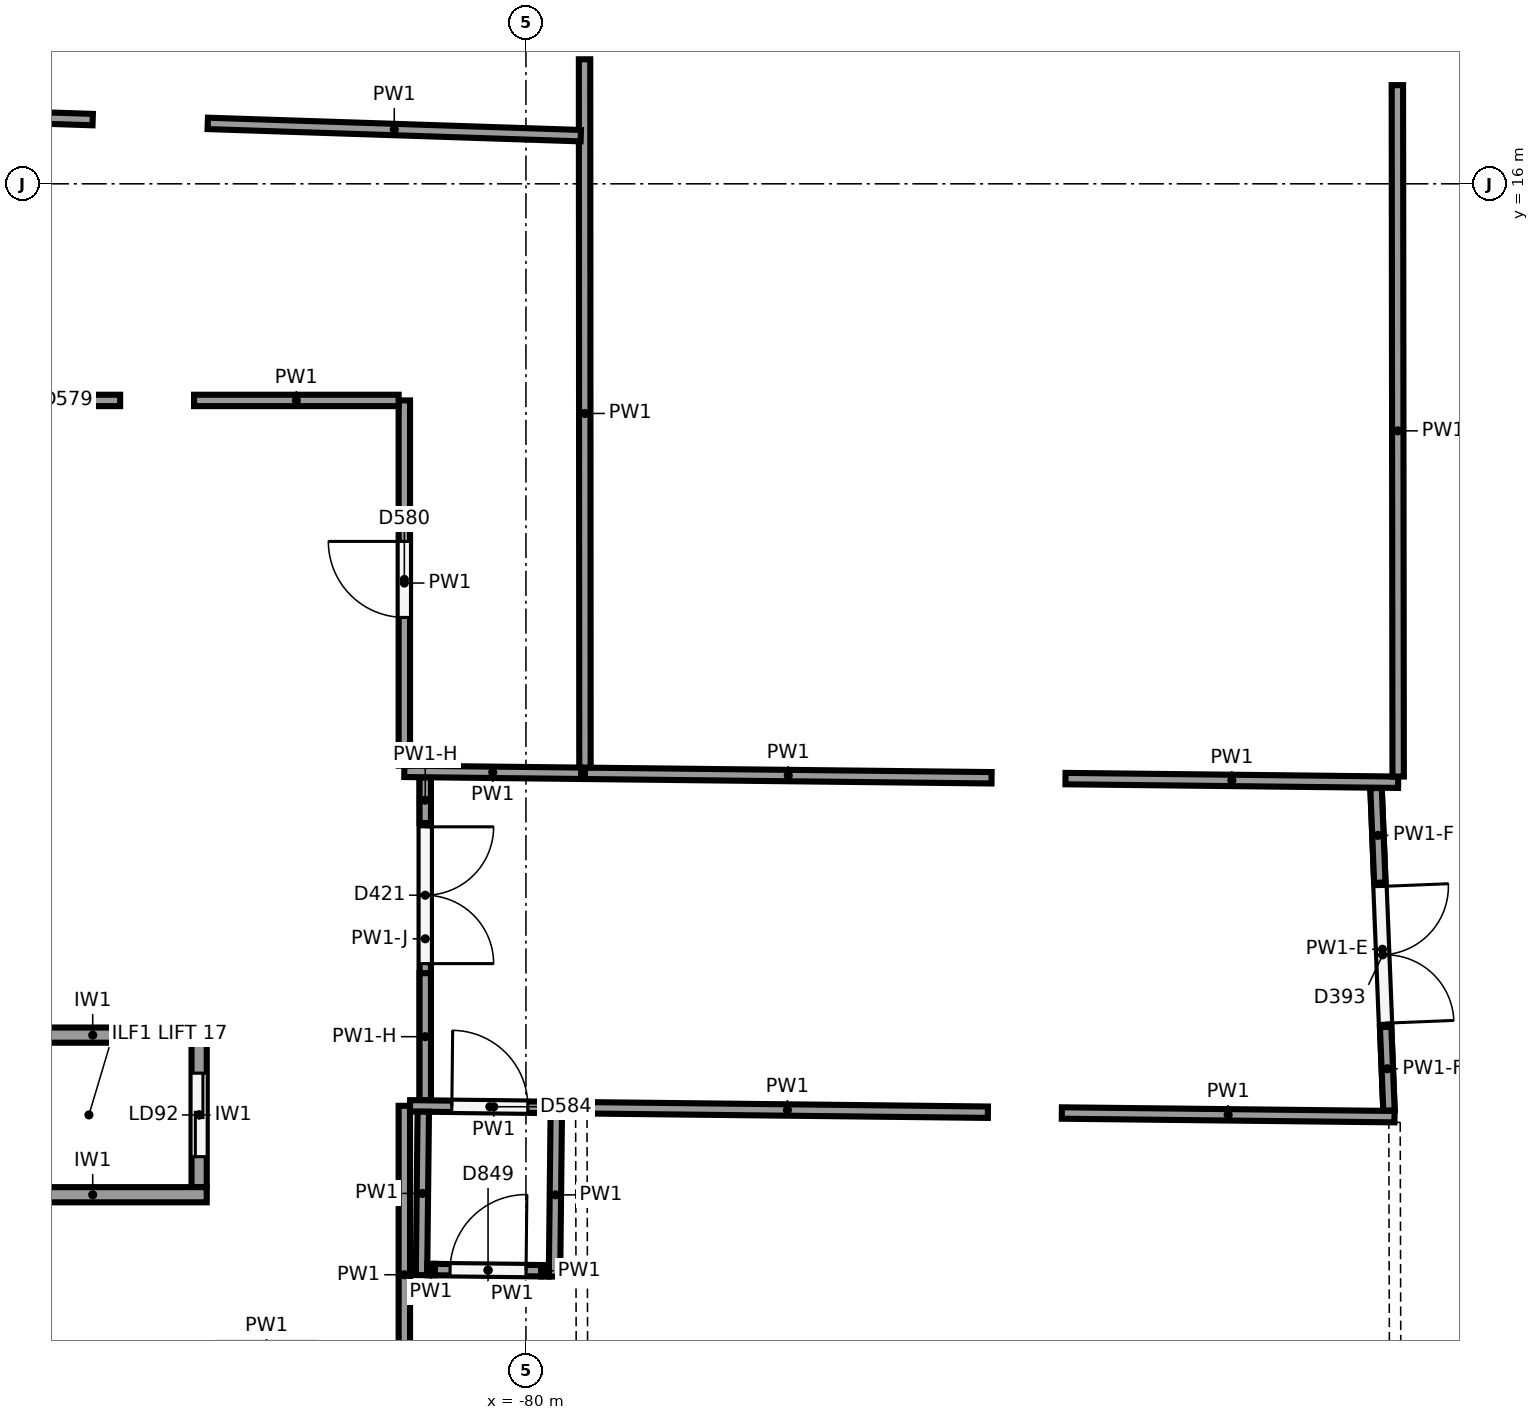
"""IFC4 building model, lengths in metres.
Left out: names, types, materials, properties, quantities, classifications, styles, units other than length and angle.
Written with IfcOpenShell. Run it as: python <this file> out.ifc"""

import sys

from ifc_helpers import new_model, si_unit, direction, frame, frame_2d, origin, origin_2d, place, context, subcontext, project, spatial, rectangle, circle, extrude, element, fill, save


model = new_model("IFC4")
c1 = context("Model", 3, precision=1e-05, world=origin(), true_north=direction((0.0, 1.0)))
c2 = subcontext(c1, "Body", "Model", "MODEL_VIEW")
j1 = project(units=[si_unit("LENGTHUNIT", "METRE"), si_unit("PLANEANGLEUNIT", "RADIAN")], contexts=[c1])
p1 = place(None, origin())
s1 = spatial("IfcSite", under=j1, at=p1, CompositionType="ELEMENT")
p2 = place(p1, origin())
s2 = spatial("IfcBuilding", under=s1, at=p2, CompositionType="ELEMENT")
p3 = place(p2, origin())
s3 = spatial("IfcBuildingStorey", under=s2, at=p3, CompositionType="ELEMENT", Elevation=0.0)
for number, where, z_axis, x_axis in (
    (1, (-73.482, 17.944, 0.0), (0.0, 0.0, 1.0), (1.0, 0.0, 0.0)),
    (2, (-73.498, 5.981, 0.0), (0.0, 0.0, 1.0), (1.0, 0.0, 0.0)),
):
    element("IfcColumn", number, at=place(p3, frame(where, z_axis=z_axis, x_axis=x_axis)), inside=s3, PredefinedType="COLUMN", context=c2, shape_type="SweptSolid", body=[
        extrude(circle(Radius=0.45, at=origin_2d()), origin(), (0.0, 0.0, 1.0), 6.5),
    ])
p4 = place(p3, frame((-84.998, 6.081, 0.0), z_axis=(0.0, 0.0, 1.0), x_axis=(1.0, 0.0, 0.0)))
e3 = element("IfcColumn", 3, at=p4, inside=s3, PredefinedType="COLUMN", context=c2, shape_type="SweptSolid", body=[
    extrude(circle(Radius=0.6, at=origin_2d()), origin(), (0.0, 0.0, 1.0), 6.5),
])
for number, where, z_axis, x_axis in (
    (4, (-87.2, 4.8, 0.0), (0.0, 0.0, 1.0), (1.0, 0.0, 0.0)),
    (5, (-87.2, 2.7, 0.0), (0.0, 0.0, 1.0), (1.0, 0.0, 0.0)),
):
    element("IfcWall", number, at=place(p3, frame(where, z_axis=z_axis, x_axis=x_axis)), inside=s3, PredefinedType="SHEAR", context=c2, shape_type="SweptSolid", body=[
        extrude(rectangle(XDim=3.0, YDim=0.2, at=frame_2d((1.5, 0.0))), origin(), (0.0, 0.0, 1.0), 6.15),
    ])
p5 = place(p3, frame((-84.3, 4.7, 0.0), z_axis=(0.0, 0.0, 1.0), x_axis=(0.0, -1.0, 0.0)))
e6 = element("IfcWall", 6, at=p5, inside=s3, PredefinedType="SHEAR", context=c2, shape_type="SweptSolid", body=[
    extrude(rectangle(XDim=1.9, YDim=0.2, at=frame_2d((0.95, 0.0))), origin(), (0.0, 0.0, 1.0), 6.15),
])
p6 = place(p5, frame((0.4, 0.0, 0.0)))
e7 = element("IfcOpeningElement", 7, at=p6, cuts=e6, PredefinedType="OPENING", context=c2, shape_type="SweptSolid", body=[
    extrude(rectangle(XDim=1.1, YDim=2.1, at=frame_2d((0.55, 1.05))), frame((0.0, 0.11, 0.0), z_axis=(0.0, -1.0, 0.0), x_axis=(1.0, 0.0, 0.0)), (0.0, 0.0, 1.0), 0.22),
])
p7 = place(p3, frame((-68.524, 8.127, 0.0), z_axis=(0.0, 0.0, 1.0), x_axis=(-0.999940244273, 0.01093196608, 0.0)))
e8 = element("IfcWall", 8, at=p7, inside=s3, PredefinedType="PARTITIONING", context=c2, shape_type="SweptSolid", body=[
    extrude(rectangle(XDim=4.377, YDim=0.15, at=frame_2d((2.188, 0.0))), origin(), (0.0, 0.0, 1.0), 6.15),
])
p8 = place(p3, frame((-73.874, 8.186, 0.0), z_axis=(0.0, 0.0, 1.0), x_axis=(-0.999939527069, 0.010997372611, 0.0)))
e9 = element("IfcWall", 9, at=p8, inside=s3, PredefinedType="PARTITIONING", context=c2, shape_type="SweptSolid", body=[
    extrude(rectangle(XDim=5.35, YDim=0.15, at=frame_2d((2.675, 0.0))), origin(), (0.0, 0.0, 1.0), 6.15),
])
p9 = place(p3, frame((-79.224, 8.319, 0.0), z_axis=(0.0, 0.0, 1.0), x_axis=(-0.00057636878, 0.9999998339, 0.0)))
e10 = element("IfcWall", 10, at=p9, inside=s3, PredefinedType="PARTITIONING", context=c2, shape_type="SweptSolid", body=[
    extrude(rectangle(XDim=9.319, YDim=0.15, at=frame_2d((4.659, 0.0))), origin(), (0.0, 0.0, 1.0), 6.15),
])
p10 = place(p3, frame((-68.535, 17.298, 0.0), z_axis=(0.0, 0.0, 1.0), x_axis=(0.001127273963, -0.999999364627, 0.0)))
e11 = element("IfcWall", 11, at=p10, inside=s3, PredefinedType="PARTITIONING", context=c2, shape_type="SweptSolid", body=[
    extrude(rectangle(XDim=9.096, YDim=0.15, at=frame_2d((4.548, 0.0))), origin(), (0.0, 0.0, 1.0), 6.15),
])
p11 = place(p3, frame((-91.413, 17.032, 0.0), z_axis=(0.0, 0.0, 1.0), x_axis=(0.999458991221, -0.032889586018, 0.0)))
e12 = element("IfcWall", 12, at=p11, inside=s3, PredefinedType="PARTITIONING", context=c2, shape_type="SweptSolid", body=[
    extrude(rectangle(XDim=5.716, YDim=0.15, at=frame_2d((2.858, 0.0))), origin(), (0.0, 0.0, 1.0), 6.15),
])
p12 = place(p3, frame((-85.339, 13.15, 0.0), z_axis=(0.0, 0.0, 1.0), x_axis=(-1.0, 0.0, 0.0)))
e13 = element("IfcWall", 13, at=p12, inside=s3, PredefinedType="PARTITIONING", context=c2, shape_type="SweptSolid", body=[
    extrude(rectangle(XDim=3.221, YDim=0.15, at=frame_2d((1.61, 0.0))), origin(), (0.0, 0.0, 1.0), 6.15),
])
p13 = place(p12, frame((1.2, 0.0, 0.0)))
e14 = element("IfcOpeningElement", 14, at=p13, cuts=e13, PredefinedType="OPENING", context=c2, shape_type="SweptSolid", body=[
    extrude(rectangle(XDim=1.0, YDim=2.1, at=frame_2d((0.5, 1.05))), frame((0.0, 0.085, 0.0), z_axis=(0.0, -1.0, 0.0), x_axis=(1.0, 0.0, 0.0)), (0.0, 0.0, 1.0), 0.17),
])
p14 = place(p3, frame((-79.274, 8.245, 0.0), z_axis=(0.0, 0.0, 1.0), x_axis=(-0.999940447056, 0.010913401878, 0.0)))
e15 = element("IfcWall", 15, at=p14, inside=s3, PredefinedType="PARTITIONING", context=c2, shape_type="SweptSolid", body=[
    extrude(rectangle(XDim=2.327, YDim=0.15, at=frame_2d((1.163, 0.0))), origin(), (0.0, 0.0, 1.0), 6.15),
])
p15 = place(p3, frame((-81.6, 8.345, 0.0), z_axis=(0.0, 0.0, 1.0), x_axis=(0.0, 1.0, 0.0)))
e16 = element("IfcWall", 16, at=p15, inside=s3, PredefinedType="PARTITIONING", context=c2, shape_type="SweptSolid", body=[
    extrude(rectangle(XDim=4.805, YDim=0.15, at=frame_2d((2.402, 0.0))), origin(), (0.0, 0.0, 1.0), 6.15),
])
p16 = place(p15, frame((1.95, 0.0, 0.0)))
e17 = element("IfcOpeningElement", 17, at=p16, cuts=e16, PredefinedType="OPENING", context=c2, shape_type="SweptSolid", body=[
    extrude(rectangle(XDim=1.0, YDim=2.1, at=frame_2d((0.5, 1.05))), frame((0.0, 0.085, 0.0), z_axis=(0.0, -1.0, 0.0), x_axis=(1.0, 0.0, 0.0)), (0.0, 0.0, 1.0), 0.17),
])
p17 = place(p3, frame((-81.675, 13.15, 0.0), z_axis=(0.0, 0.0, 1.0), x_axis=(-1.0, 0.0, 0.0)))
e18 = element("IfcWall", 18, at=p17, inside=s3, PredefinedType="PARTITIONING", context=c2, shape_type="SweptSolid", body=[
    extrude(rectangle(XDim=2.692, YDim=0.15, at=frame_2d((1.346, 0.0))), origin(), (0.0, 0.0, 1.0), 6.15),
])
p18 = place(p3, frame((-84.187, 16.795, 0.0), z_axis=(0.0, 0.0, 1.0), x_axis=(0.999458234684, -0.032912567844, 0.0)))
e19 = element("IfcWall", 19, at=p18, inside=s3, PredefinedType="PARTITIONING", context=c2, shape_type="SweptSolid", body=[
    extrude(rectangle(XDim=4.911, YDim=0.15, at=frame_2d((2.455, 0.0))), origin(), (0.0, 0.0, 1.0), 6.15),
])
p19 = place(p3, frame((-79.249, -5.55, 0.0), z_axis=(0.0, 0.0, 1.0), x_axis=(-0.002442883638, 0.999997016155, 0.0)))
e20 = element("IfcWall", 20, at=p19, inside=s3, PredefinedType="PARTITIONING", context=c2, shape_type="SweptSolid", body=[
    extrude(rectangle(XDim=9.394, YDim=0.15, at=frame_2d((4.697, 0.0))), origin(), (0.0, 0.0, 1.0), 6.15),
])
p20 = place(p3, frame((-79.197, 3.844, 0.0), z_axis=(0.0, 0.0, 1.0), x_axis=(0.999939838458, -0.010969022991, 0.0)))
e21 = element("IfcWall", 21, at=p20, inside=s3, PredefinedType="PARTITIONING", context=c2, shape_type="SweptSolid", body=[
    extrude(rectangle(XDim=5.275, YDim=0.15, at=frame_2d((2.637, 0.0))), origin(), (0.0, 0.0, 1.0), 6.15),
])
p21 = place(p3, frame((-72.949, 3.775, 0.0), z_axis=(0.0, 0.0, 1.0), x_axis=(0.999940244273, -0.01093196608, 0.0)))
e22 = element("IfcWall", 22, at=p21, inside=s3, PredefinedType="PARTITIONING", context=c2, shape_type="SweptSolid", body=[
    extrude(rectangle(XDim=4.377, YDim=0.15, at=frame_2d((2.188, 0.0))), origin(), (0.0, 0.0, 1.0), 6.15),
])
p22 = place(p3, frame((-68.572, 3.652, 0.0), z_axis=(0.0, 0.0, 1.0), x_axis=(0.00249603345, -0.999996884904, 0.0)))
e23 = element("IfcWall", 23, at=p22, inside=s3, PredefinedType="PARTITIONING", context=c2, shape_type="SweptSolid", body=[
    extrude(rectangle(XDim=9.096, YDim=0.15, at=frame_2d((4.548, 0.0))), origin(), (0.0, 0.0, 1.0), 6.15),
])
p23 = place(p22, frame((3.95, 0.0, 0.0)))
e24 = element("IfcOpeningElement", 24, at=p23, cuts=e23, PredefinedType="OPENING", context=c2, shape_type="SweptSolid", body=[
    extrude(rectangle(XDim=1.0, YDim=2.1, at=frame_2d((0.5, 1.05))), frame((0.0, 0.085, 0.0), z_axis=(0.0, -1.0, 0.0), x_axis=(1.0, 0.0, 0.0)), (0.0, 0.0, 1.0), 0.17),
])
p24 = place(p3, frame((-81.6, -0.575, 0.0), z_axis=(0.0, 0.0, 1.0), x_axis=(0.0, 1.0, 0.0)))
e25 = element("IfcWall", 25, at=p24, inside=s3, PredefinedType="PARTITIONING", context=c2, shape_type="SweptSolid", body=[
    extrude(rectangle(XDim=4.445, YDim=0.15, at=frame_2d((2.223, 0.0))), origin(), (0.0, 0.0, 1.0), 6.15),
])
p25 = place(p3, frame((-81.525, 3.869, 0.0), z_axis=(0.0, 0.0, 1.0), x_axis=(0.999941036186, -0.010859288735, 0.0)))
e26 = element("IfcWall", 26, at=p25, inside=s3, PredefinedType="PARTITIONING", context=c2, shape_type="SweptSolid", body=[
    extrude(rectangle(XDim=2.203, YDim=0.15, at=frame_2d((1.102, 0.0))), origin(), (0.0, 0.0, 1.0), 6.15),
])
p26 = place(p25, frame((0.55, 0.0, 0.0)))
e27 = element("IfcOpeningElement", 27, at=p26, cuts=e26, PredefinedType="OPENING", context=c2, shape_type="SweptSolid", body=[
    extrude(rectangle(XDim=1.0, YDim=2.1, at=frame_2d((0.5, 1.05))), frame((0.0, 0.085, 0.0), z_axis=(0.0, -1.0, 0.0), x_axis=(1.0, 0.0, 0.0)), (0.0, 0.0, 1.0), 0.17),
])
for number, where, z_axis, x_axis in (
    (28, (-81.351, 3.792, 0.0), (0.0, 0.0, 1.0), (-0.011, -1.0, 0.0)),
    (29, (-79.601, 3.773, 0.0), (0.0, 0.0, 1.0), (-0.011, -1.0, 0.0)),
):
    element("IfcWall", number, at=place(p3, frame(where, z_axis=z_axis, x_axis=x_axis)), inside=s3, PredefinedType="PARTITIONING", context=c2, shape_type="SweptSolid", body=[
        extrude(rectangle(XDim=2.15, YDim=0.15, at=frame_2d((1.075, 0.0))), origin(), (0.0, 0.0, 1.0), 6.15),
    ])
p27 = place(p3, frame((-81.299, 1.717, 0.0), z_axis=(0.0, 0.0, 1.0), x_axis=(0.999952412677, -0.009755633294, 0.0)))
e30 = element("IfcWall", 30, at=p27, inside=s3, PredefinedType="PARTITIONING", context=c2, shape_type="SweptSolid", body=[
    extrude(rectangle(XDim=0.1, YDim=0.15, at=frame_2d((0.05, 0.0))), origin(), (0.0, 0.0, 1.0), 6.15),
])
p28 = place(p3, frame((-81.198, 1.716, 0.0), z_axis=(0.0, 0.0, 1.0), x_axis=(0.999939647341, -0.010986431424, 0.0)))
e31 = element("IfcWall", 31, at=p28, inside=s3, PredefinedType="PARTITIONING", context=c2, shape_type="SweptSolid", body=[
    extrude(rectangle(XDim=1.4, YDim=0.15, at=frame_2d((0.7, 0.0))), origin(), (0.0, 0.0, 1.0), 6.15),
])
p29 = place(p28, frame((0.2, 0.0, 0.0)))
e32 = element("IfcOpeningElement", 32, at=p29, cuts=e31, PredefinedType="OPENING", context=c2, shape_type="SweptSolid", body=[
    extrude(rectangle(XDim=1.0, YDim=2.1, at=frame_2d((0.5, 1.05))), frame((0.0, 0.085, 0.0), z_axis=(0.0, -1.0, 0.0), x_axis=(1.0, 0.0, 0.0)), (0.0, 0.0, 1.0), 0.17),
])
p30 = place(p3, frame((-79.799, 1.7, 0.0), z_axis=(0.0, 0.0, 1.0), x_axis=(0.999952412677, -0.009755633294, 0.0)))
e33 = element("IfcWall", 33, at=p30, inside=s3, PredefinedType="PARTITIONING", context=c2, shape_type="SweptSolid", body=[
    extrude(rectangle(XDim=0.1, YDim=0.15, at=frame_2d((0.05, 0.0))), origin(), (0.0, 0.0, 1.0), 6.15),
])
p31 = place(p3, frame((-81.325, 8.19, 0.0), z_axis=(0.0, 0.0, 1.0), x_axis=(0.0, -1.0, 0.0)))
e34 = element("IfcWall", 34, at=p31, inside=s3, PredefinedType="PARTITIONING", context=c2, shape_type="SweptSolid", body=[
    extrude(rectangle(XDim=4.247, YDim=0.15, at=frame_2d((2.123, 0.0))), origin(), (0.0, 0.0, 1.0), 5.05),
])
p32 = place(p31, frame((0.65, 0.0, 0.0)))
e35 = element("IfcOpeningElement", 35, at=p32, cuts=e34, PredefinedType="OPENING", context=c2, shape_type="SweptSolid", body=[
    extrude(rectangle(XDim=1.8, YDim=2.1, at=frame_2d((0.9, 1.05))), frame((0.0, 0.085, 0.0), z_axis=(0.0, -1.0, 0.0), x_axis=(1.0, 0.0, 0.0)), (0.0, 0.0, 1.0), 0.17),
])
p33 = place(p3, frame((-81.325, 8.19, 5.05), z_axis=(0.0, 0.0, 1.0), x_axis=(0.0, -1.0, 0.0)))
e36 = element("IfcWall", 36, at=p33, inside=s3, PredefinedType="PARTITIONING", context=c2, shape_type="SweptSolid", body=[
    extrude(rectangle(XDim=0.6, YDim=0.15, at=frame_2d((0.3, 0.0))), origin(), (0.0, 0.0, 1.0), 1.1),
])
p34 = place(p3, frame((-81.325, 5.615, 5.05), z_axis=(0.0, 0.0, 1.0), x_axis=(0.0, -1.0, 0.0)))
e37 = element("IfcWall", 37, at=p34, inside=s3, PredefinedType="PARTITIONING", context=c2, shape_type="SweptSolid", body=[
    extrude(rectangle(XDim=1.671, YDim=0.15, at=frame_2d((0.835, 0.0))), origin(), (0.0, 0.0, 1.0), 1.1),
])
p35 = place(p3, frame((-68.815, 8.05, 0.0), z_axis=(0.0, 0.0, 1.0), x_axis=(0.040078263849, -0.999196543612, 0.0)))
e38 = element("IfcWall", 38, at=p35, inside=s3, PredefinedType="PARTITIONING", context=c2, shape_type="SweptSolid", body=[
    extrude(rectangle(XDim=4.246, YDim=0.15, at=frame_2d((2.123, 0.0))), origin(), (0.0, 0.0, 1.0), 5.25),
])
p36 = place(p35, frame((1.296, 0.0, 0.0)))
e39 = element("IfcOpeningElement", 39, at=p36, cuts=e38, PredefinedType="OPENING", context=c2, shape_type="SweptSolid", body=[
    extrude(rectangle(XDim=1.8, YDim=2.1, at=frame_2d((0.9, 1.05))), frame((0.0, 0.085, 0.0), z_axis=(0.0, -1.0, 0.0), x_axis=(1.0, 0.0, 0.0)), (0.0, 0.0, 1.0), 0.17),
])
p37 = place(p3, frame((-68.689, 4.907, 5.25), z_axis=(0.0, 0.0, 1.0), x_axis=(0.0401719, -0.999192783426, 0.0)))
e40 = element("IfcWall", 40, at=p37, inside=s3, PredefinedType="PARTITIONING", context=c2, shape_type="SweptSolid", body=[
    extrude(rectangle(XDim=1.1, YDim=0.15, at=frame_2d((0.55, 0.0))), origin(), (0.0, 0.0, 1.0), 0.9),
])
p38 = place(p3, frame((-68.815, 8.05, 5.25), z_axis=(0.0, 0.0, 1.0), x_axis=(0.039975864231, -0.999200645656, 0.0)))
e41 = element("IfcWall", 41, at=p38, inside=s3, PredefinedType="PARTITIONING", context=c2, shape_type="SweptSolid", body=[
    extrude(rectangle(XDim=1.246, YDim=0.15, at=frame_2d((0.623, 0.0))), origin(), (0.0, 0.0, 1.0), 0.9),
])
p39 = place(p6, origin())
e42 = element("IfcDoor", 42, at=p39, inside=s3, OperationType="SLIDING_TO_RIGHT", PredefinedType="DOOR", context=c2, shape_type="SweptSolid", body=[
    extrude(rectangle(XDim=1.1, YDim=2.1, at=frame_2d((0.55, 1.05))), frame((0.0, 0.025, 0.0), z_axis=(0.0, -1.0, 0.0), x_axis=(1.0, 0.0, 0.0)), (0.0, 0.0, 1.0), 0.05),
])
fill(e7, e42)
p40 = place(p16, origin())
e43 = element("IfcDoor", 43, at=p40, inside=s3, OperationType="SINGLE_SWING_RIGHT", PredefinedType="DOOR", context=c2, shape_type="SweptSolid", body=[
    extrude(rectangle(XDim=1.0, YDim=2.1, at=frame_2d((0.5, 1.05))), frame((0.0, 0.025, 0.0), z_axis=(0.0, -1.0, 0.0), x_axis=(1.0, 0.0, 0.0)), (0.0, 0.0, 1.0), 0.05),
])
fill(e17, e43)
p41 = place(p26, origin())
e44 = element("IfcDoor", 44, at=p41, inside=s3, OperationType="SINGLE_SWING_LEFT", PredefinedType="DOOR", context=c2, shape_type="SweptSolid", body=[
    extrude(rectangle(XDim=1.0, YDim=2.1, at=frame_2d((0.5, 1.05))), frame((0.0, 0.025, 0.0), z_axis=(0.0, -1.0, 0.0), x_axis=(1.0, 0.0, 0.0)), (0.0, 0.0, 1.0), 0.05),
])
fill(e27, e44)
p42 = place(p29, origin())
e45 = element("IfcDoor", 45, at=p42, inside=s3, OperationType="SINGLE_SWING_RIGHT", PredefinedType="DOOR", context=c2, shape_type="SweptSolid", body=[
    extrude(rectangle(XDim=1.0, YDim=2.1, at=frame_2d((0.5, 1.05))), frame((0.0, 0.025, 0.0), z_axis=(0.0, -1.0, 0.0), x_axis=(1.0, 0.0, 0.0)), (0.0, 0.0, 1.0), 0.05),
])
fill(e32, e45)
p43 = place(p32, origin())
e46 = element("IfcDoor", 46, at=p43, inside=s3, OperationType="DOUBLE_DOOR_SINGLE_SWING", PredefinedType="DOOR", context=c2, shape_type="SweptSolid", body=[
    extrude(rectangle(XDim=1.8, YDim=2.1, at=frame_2d((0.9, 1.05))), frame((0.0, 0.025, 0.0), z_axis=(0.0, -1.0, 0.0), x_axis=(1.0, 0.0, 0.0)), (0.0, 0.0, 1.0), 0.05),
])
fill(e35, e46)
p44 = place(p36, origin())
e47 = element("IfcDoor", 47, at=p44, inside=s3, OperationType="DOUBLE_DOOR_SINGLE_SWING", PredefinedType="DOOR", context=c2, shape_type="SweptSolid", body=[
    extrude(rectangle(XDim=1.8, YDim=2.1, at=frame_2d((0.9, 1.05))), frame((0.0, 0.025, 0.0), z_axis=(0.0, -1.0, 0.0), x_axis=(1.0, 0.0, 0.0)), (0.0, 0.0, 1.0), 0.05),
])
fill(e39, e47)
save(model, sys.argv[1])
